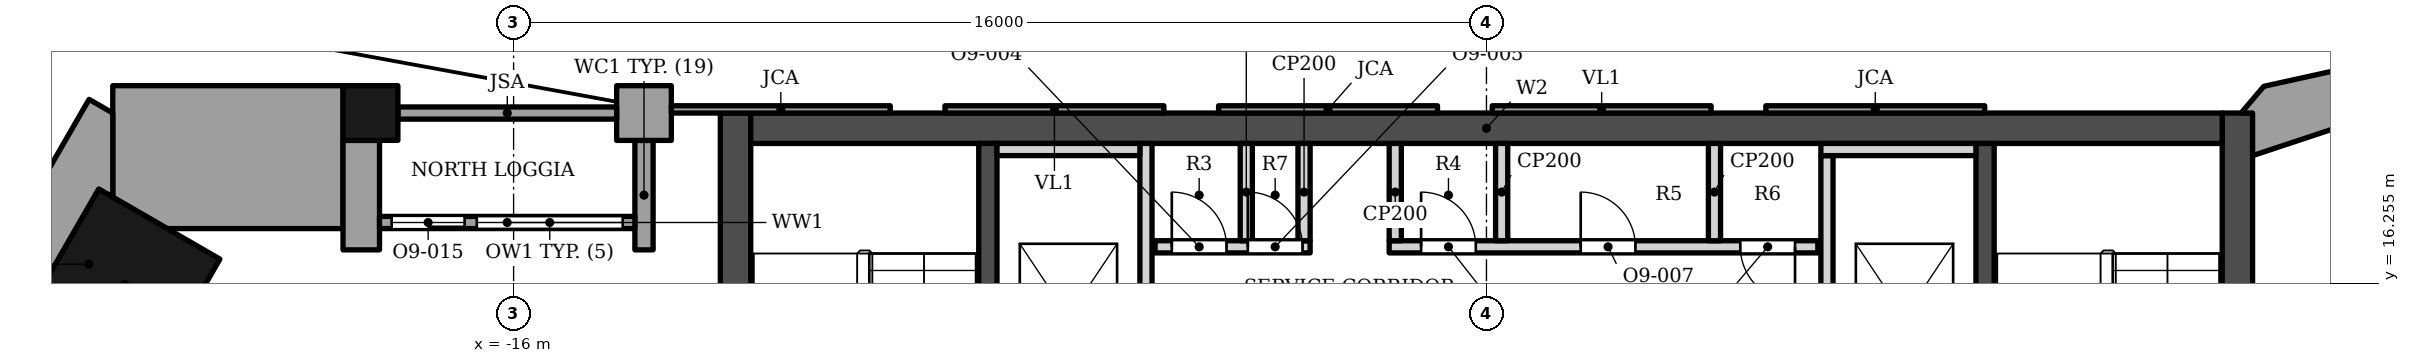
"""IFC4 building model, lengths in metres.
Left out: names, types, materials, properties, quantities, classifications, styles, units other than length and angle.
Written with IfcOpenShell. Run it as: python <this file> out.ifc"""

import sys

from ifc_helpers import new_model, si_unit, direction, frame, frame_2d, origin, origin_2d, place, context, subcontext, project, spatial, polyline, rectangle, outline, extrude, element, fill, save


model = new_model("IFC4")
c1 = context("Model", 3, precision=1e-05, world=origin(), true_north=direction((0.0, 1.0)))
c2 = subcontext(c1, "Body", "Model", "MODEL_VIEW")
j1 = project(units=[si_unit("LENGTHUNIT", "METRE"), si_unit("PLANEANGLEUNIT", "RADIAN")], contexts=[c1])
p1 = place(None, origin())
s1 = spatial("IfcSite", under=j1, at=p1, CompositionType="ELEMENT")
p2 = place(p1, origin())
s2 = spatial("IfcBuilding", under=s1, at=p2, CompositionType="ELEMENT")
p3 = place(p2, frame((0.0, 0.0, 248.2)))
s3 = spatial("IfcBuildingStorey", under=s2, at=p3, CompositionType="ELEMENT", Elevation=248.2)
p4 = place(p3, frame((-12.1, 18.802, 0.0), z_axis=(0.0, 0.0, 1.0), x_axis=(1.0, 0.0, 0.0)))
e1 = element("IfcWall", 1, at=p4, inside=s3, PredefinedType="SHEAR", context=c2, shape_type="SweptSolid", body=[
    extrude(rectangle(XDim=24.2, YDim=0.5, at=frame_2d((12.1, 0.0))), origin(), (0.0, 0.0, 1.0), 3.9),
])
p5 = place(p3, frame((-12.35, 5.253, 0.0), z_axis=(0.0, 0.0, 1.0), x_axis=(0.0, 1.0, 0.0)))
e2 = element("IfcWall", 2, at=p5, inside=s3, PredefinedType="SHEAR", context=c2, shape_type="SweptSolid", body=[
    extrude(rectangle(XDim=13.8, YDim=0.5, at=frame_2d((6.9, 0.0))), origin(), (0.0, 0.0, 1.0), 3.9),
])
p6 = place(p3, frame((-8.2, 5.253, 0.0), z_axis=(0.0, 0.0, 1.0), x_axis=(0.0, 1.0, 0.0)))
e3 = element("IfcWall", 3, at=p6, inside=s3, PredefinedType="SHEAR", context=c2, shape_type="SweptSolid", body=[
    extrude(rectangle(XDim=13.3, YDim=0.3, at=frame_2d((6.65, 0.0))), origin(), (0.0, 0.0, 1.0), 3.9),
])
p7 = place(p6, frame((7.1, 0.0, 0.0)))
e4 = element("IfcOpeningElement", 4, at=p7, cuts=e3, PredefinedType="OPENING", context=c2, shape_type="SweptSolid", body=[
    extrude(rectangle(XDim=1.4, YDim=2.1, at=frame_2d((0.7, 1.05))), frame((0.0, 0.16, 0.0), z_axis=(0.0, -1.0, 0.0), x_axis=(1.0, 0.0, 0.0)), (0.0, 0.0, 1.0), 0.32),
])
p8 = place(p6, frame((5.05, 0.0, 0.0)))
e5 = element("IfcOpeningElement", 5, at=p8, cuts=e3, PredefinedType="OPENING", context=c2, shape_type="SweptSolid", body=[
    extrude(rectangle(XDim=1.4, YDim=2.1, at=frame_2d((0.7, 1.05))), frame((0.0, 0.16, 0.0), z_axis=(0.0, -1.0, 0.0), x_axis=(1.0, 0.0, 0.0)), (0.0, 0.0, 1.0), 0.32),
])
p9 = place(p3, frame((12.35, 5.253, 0.0), z_axis=(0.0, 0.0, 1.0), x_axis=(0.0, 1.0, 0.0)))
e6 = element("IfcWall", 6, at=p9, inside=s3, PredefinedType="SHEAR", context=c2, shape_type="SweptSolid", body=[
    extrude(rectangle(XDim=13.8, YDim=0.5, at=frame_2d((6.9, 0.0))), origin(), (0.0, 0.0, 1.0), 3.9),
])
p10 = place(p3, frame((8.2, 5.253, 0.0), z_axis=(0.0, 0.0, 1.0), x_axis=(0.0, 1.0, 0.0)))
e7 = element("IfcWall", 7, at=p10, inside=s3, PredefinedType="SHEAR", context=c2, shape_type="SweptSolid", body=[
    extrude(rectangle(XDim=13.3, YDim=0.3, at=frame_2d((6.65, 0.0))), origin(), (0.0, 0.0, 1.0), 3.9),
])
p11 = place(p10, frame((7.1, 0.0, 0.0)))
e8 = element("IfcOpeningElement", 8, at=p11, cuts=e7, PredefinedType="OPENING", context=c2, shape_type="SweptSolid", body=[
    extrude(rectangle(XDim=1.4, YDim=2.1, at=frame_2d((0.7, 1.05))), frame((0.0, 0.16, 0.0), z_axis=(0.0, -1.0, 0.0), x_axis=(1.0, 0.0, 0.0)), (0.0, 0.0, 1.0), 0.32),
])
p12 = place(p10, frame((5.05, 0.0, 0.0)))
e9 = element("IfcOpeningElement", 9, at=p12, cuts=e7, PredefinedType="OPENING", context=c2, shape_type="SweptSolid", body=[
    extrude(rectangle(XDim=1.4, YDim=2.1, at=frame_2d((0.7, 1.05))), frame((0.0, 0.16, 0.0), z_axis=(0.0, -1.0, 0.0), x_axis=(1.0, 0.0, 0.0)), (0.0, 0.0, 1.0), 0.32),
])
p13 = place(p3, frame((-22.401, 16.23, 0.0), z_axis=(0.0, 0.0, 1.0), x_axis=(0.866025377604, -0.500000045345, 0.0)))
e10 = element("IfcColumn", 10, at=p13, inside=s3, PredefinedType="COLUMN", context=c2, shape_type="SweptSolid", body=[
    extrude(rectangle(XDim=2.3, YDim=2.3, at=origin_2d()), origin(), (0.0, 0.0, 1.0), 3.9),
])
p14 = place(p3, frame((-18.353, 19.053, 0.0), z_axis=(0.0, 0.0, 1.0), x_axis=(-1.0, 0.0, 0.0)))
e11 = element("IfcColumn", 11, at=p14, inside=s3, PredefinedType="COLUMN", context=c2, shape_type="SweptSolid", body=[
    extrude(rectangle(XDim=0.9, YDim=0.9, at=origin_2d()), origin(), (0.0, 0.0, 1.0), 3.9),
])
p15 = place(p3, origin())
e12 = element("IfcWall", 12, at=p15, inside=s3, PredefinedType="SOLIDWALL", context=c2, shape_type="SweptSolid", body=[
    extrude(outline(polyline([(-13.406, 19.502), (-14.305, 19.502), (-14.305, 18.603), (-13.406, 18.603), (-13.406, 19.502)])), origin(), (0.0, 0.0, 1.0), 3.0),
])
p16 = place(p3, origin())
e13 = element("IfcWall", 13, at=p16, inside=s3, PredefinedType="SOLIDWALL", context=c2, shape_type="SweptSolid", body=[
    extrude(outline(polyline([(-13.705, 16.802), (-13.705, 18.603), (-14.005, 18.603), (-14.005, 16.802), (-13.705, 16.802)])), origin(), (0.0, 0.0, 1.0), 3.0),
])
p17 = place(p3, origin())
e14 = element("IfcWall", 14, at=p17, inside=s3, PredefinedType="SOLIDWALL", context=c2, shape_type="SweptSolid", body=[
    extrude(outline(polyline([(-18.805, 18.603), (-18.805, 16.802), (-18.205, 16.802), (-18.205, 18.603), (-18.805, 18.603)])), origin(), (0.0, 0.0, 1.0), 3.0),
])
p18 = place(p3, origin())
e15 = element("IfcWall", 15, at=p18, inside=s3, PredefinedType="SOLIDWALL", context=c2, shape_type="SweptSolid", body=[
    extrude(outline(polyline([(4.594, 19.173), (4.594, 19.052), (8.195, 19.052), (8.195, 19.173), (4.594, 19.173)])), origin(), (0.0, 0.0, 1.0), 3.0),
])
p19 = place(p3, origin())
e16 = element("IfcWall", 16, at=p19, inside=s3, PredefinedType="ELEMENTEDWALL", context=c2, shape_type="SweptSolid", body=[
    extrude(outline(polyline([(0.094, 19.173), (0.094, 19.052), (3.695, 19.052), (3.695, 19.173), (0.094, 19.173)])), origin(), (0.0, 0.0, 1.0), 3.0),
])
p20 = place(p3, origin())
e17 = element("IfcWall", 17, at=p20, inside=s3, PredefinedType="SOLIDWALL", context=c2, shape_type="SweptSolid", body=[
    extrude(outline(polyline([(-4.406, 19.173), (-4.406, 19.052), (-0.805, 19.052), (-0.805, 19.173), (-4.406, 19.173)])), origin(), (0.0, 0.0, 1.0), 3.0),
])
p21 = place(p3, origin())
e18 = element("IfcWall", 18, at=p21, inside=s3, PredefinedType="ELEMENTEDWALL", context=c2, shape_type="SweptSolid", body=[
    extrude(outline(polyline([(-8.906, 19.173), (-8.906, 19.052), (-5.305, 19.052), (-5.305, 19.173), (-8.906, 19.173)])), origin(), (0.0, 0.0, 1.0), 3.0),
])
p22 = place(p3, origin())
e19 = element("IfcWall", 19, at=p22, inside=s3, PredefinedType="SOLIDWALL", context=c2, shape_type="SweptSolid", body=[
    extrude(outline(polyline([(-13.405, 19.173), (-13.405, 19.052), (-9.805, 19.052), (-9.805, 19.173), (-13.405, 19.173)])), origin(), (0.0, 0.0, 1.0), 3.0),
])
p23 = place(p3, origin())
e20 = element("IfcWall", 20, at=p23, inside=s3, PredefinedType="SOLIDWALL", context=c2, shape_type="SweptSolid", body=[
    extrude(outline(polyline([(-14.305, 19.153), (-17.903, 19.153), (-17.903, 18.953), (-14.305, 18.953), (-14.305, 19.153)])), origin(), (0.0, 0.0, 1.0), 3.0),
])
p24 = place(p3, frame((-14.005, 17.252, 0.0), z_axis=(0.0, 0.0, 1.0), x_axis=(-1.0, 0.0, 0.0)))
e21 = element("IfcWall", 21, at=p24, inside=s3, PredefinedType="ELEMENTEDWALL", context=c2, shape_type="SweptSolid", body=[
    extrude(rectangle(XDim=4.2, YDim=0.2, at=frame_2d((2.1, 0.0))), origin(), (0.0, 0.0, 1.0), 3.0),
])
p25 = place(p24, frame((0.2, 0.0, 0.45)))
e22 = element("IfcOpeningElement", 22, at=p25, cuts=e21, PredefinedType="OPENING", context=c2, shape_type="SweptSolid", body=[
    extrude(rectangle(XDim=2.4, YDim=2.25, at=frame_2d((1.2, 1.125))), frame((0.0, 0.11, 0.0), z_axis=(0.0, -1.0, 0.0), x_axis=(1.0, 0.0, 0.0)), (0.0, 0.0, 1.0), 0.22),
])
p26 = place(p24, frame((2.8, 0.0, 0.0)))
e23 = element("IfcOpeningElement", 23, at=p26, cuts=e21, PredefinedType="OPENING", context=c2, shape_type="SweptSolid", body=[
    extrude(rectangle(XDim=1.2, YDim=2.7, at=frame_2d((0.6, 1.35))), frame((0.0, 0.11, 0.0), z_axis=(0.0, -1.0, 0.0), x_axis=(1.0, 0.0, 0.0)), (0.0, 0.0, 1.0), 0.22),
])
p27 = place(p3, origin())
e24 = element("IfcWall", 24, at=p27, inside=s3, PredefinedType="SOLIDWALL", context=c2, shape_type="SweptSolid", body=[
    extrude(outline(polyline([(-21.699, 17.153), (-18.805, 17.153), (-18.805, 19.502), (-22.592, 19.502), (-22.592, 17.668), (-21.699, 17.153)])), origin(), (0.0, 0.0, 1.0), 3.0),
])
p28 = place(p3, origin())
e25 = element("IfcWall", 25, at=p28, inside=s3, PredefinedType="SOLIDWALL", context=c2, shape_type="SweptSolid", body=[
    extrude(outline(polyline([(-22.822, 17.801), (-22.592, 17.668), (-22.592, 19.052), (-22.982, 19.278), (-25.331, 15.208), (-23.296, 14.033), (-22.696, 15.073), (-23.972, 15.809), (-22.822, 17.801)])), origin(), (0.0, 0.0, 1.0), 3.0),
])
p29 = place(p3, origin())
e26 = element("IfcWall", 26, at=p29, inside=s3, PredefinedType="SOLIDWALL", context=c2, shape_type="SweptSolid", body=[
    extrude(outline(polyline([(14.201, 18.883), (14.008, 19.762), (12.784, 19.492), (12.41, 19.052), (12.6, 19.052), (12.6, 18.352), (14.201, 18.883)])), origin(), (0.0, 0.0, 1.0), 3.0),
])
p30 = place(p3, frame((-5.6, 14.253, 0.0), z_axis=(0.0, 0.0, 1.0), x_axis=(0.0, 1.0, 0.0)))
e27 = element("IfcWall", 27, at=p30, inside=s3, PredefinedType="SOLIDWALL", context=c2, shape_type="SweptSolid", body=[
    extrude(rectangle(XDim=4.3, YDim=0.2, at=frame_2d((2.15, 0.0))), origin(), (0.0, 0.0, 1.0), 3.73),
])
p31 = place(p3, frame((5.6, 15.453, 0.0), z_axis=(0.0, 0.0, 1.0), x_axis=(0.0, 1.0, 0.0)))
e28 = element("IfcWall", 28, at=p31, inside=s3, PredefinedType="SOLIDWALL", context=c2, shape_type="SweptSolid", body=[
    extrude(rectangle(XDim=2.9, YDim=0.2, at=frame_2d((1.45, 0.0))), origin(), (0.0, 0.0, 1.0), 3.73),
])
p32 = place(p3, frame((-5.45, 16.853, 0.0), z_axis=(0.0, 0.0, 1.0), x_axis=(1.0, 0.0, 0.0)))
e29 = element("IfcWall", 29, at=p32, inside=s3, PredefinedType="SOLIDWALL", context=c2, shape_type="SweptSolid", body=[
    extrude(rectangle(XDim=2.55, YDim=0.2, at=frame_2d((1.275, 0.0))), origin(), (0.0, 0.0, 1.0), 3.73),
])
p33 = place(p32, frame((0.275, 0.0, 0.0)))
e30 = element("IfcOpeningElement", 30, at=p33, cuts=e29, PredefinedType="OPENING", context=c2, shape_type="SweptSolid", body=[
    extrude(rectangle(XDim=0.9, YDim=2.1, at=frame_2d((0.45, 1.05))), frame((0.0, 0.11, 0.0), z_axis=(0.0, -1.0, 0.0), x_axis=(1.0, 0.0, 0.0)), (0.0, 0.0, 1.0), 0.22),
])
p34 = place(p32, frame((1.525, 0.0, 0.0)))
e31 = element("IfcOpeningElement", 31, at=p34, cuts=e29, PredefinedType="OPENING", context=c2, shape_type="SweptSolid", body=[
    extrude(rectangle(XDim=0.9, YDim=2.1, at=frame_2d((0.45, 1.05))), frame((0.0, 0.11, 0.0), z_axis=(0.0, -1.0, 0.0), x_axis=(1.0, 0.0, 0.0)), (0.0, 0.0, 1.0), 0.22),
])
p35 = place(p3, frame((-1.6, 16.853, 0.0), z_axis=(0.0, 0.0, 1.0), x_axis=(1.0, 0.0, 0.0)))
e32 = element("IfcWall", 32, at=p35, inside=s3, PredefinedType="SOLIDWALL", context=c2, shape_type="SweptSolid", body=[
    extrude(rectangle(XDim=7.05, YDim=0.2, at=frame_2d((3.525, 0.0))), origin(), (0.0, 0.0, 1.0), 3.73),
])
p36 = place(p35, frame((0.525, 0.0, 0.0)))
e33 = element("IfcOpeningElement", 33, at=p36, cuts=e32, PredefinedType="OPENING", context=c2, shape_type="SweptSolid", body=[
    extrude(rectangle(XDim=0.9, YDim=2.1, at=frame_2d((0.45, 1.05))), frame((0.0, 0.11, 0.0), z_axis=(0.0, -1.0, 0.0), x_axis=(1.0, 0.0, 0.0)), (0.0, 0.0, 1.0), 0.22),
])
p37 = place(p35, frame((3.15, 0.0, 0.0)))
e34 = element("IfcOpeningElement", 34, at=p37, cuts=e32, PredefinedType="OPENING", context=c2, shape_type="SweptSolid", body=[
    extrude(rectangle(XDim=0.9, YDim=2.1, at=frame_2d((0.45, 1.05))), frame((0.0, 0.11, 0.0), z_axis=(0.0, -1.0, 0.0), x_axis=(1.0, 0.0, 0.0)), (0.0, 0.0, 1.0), 0.22),
])
p38 = place(p35, frame((5.775, 0.0, 0.0)))
e35 = element("IfcOpeningElement", 35, at=p38, cuts=e32, PredefinedType="OPENING", context=c2, shape_type="SweptSolid", body=[
    extrude(rectangle(XDim=0.9, YDim=2.1, at=frame_2d((0.45, 1.05))), frame((0.0, 0.11, 0.0), z_axis=(0.0, -1.0, 0.0), x_axis=(1.0, 0.0, 0.0)), (0.0, 0.0, 1.0), 0.22),
])
for number, where, z_axis, x_axis in (
    (36, (-3.95, 16.953, 0.0), (0.0, 0.0, 1.0), (0.0, 1.0, 0.0)),
    (37, (-3.0, 16.953, 0.0), (0.0, 0.0, 1.0), (0.0, 1.0, 0.0)),
    (38, (-1.5, 16.953, 0.0), (0.0, 0.0, 1.0), (0.0, 1.0, 0.0)),
    (39, (0.25, 16.953, 0.0), (0.0, 0.0, 1.0), (0.0, 1.0, 0.0)),
    (40, (3.75, 16.953, 0.0), (0.0, 0.0, 1.0), (0.0, 1.0, 0.0)),
):
    element("IfcWall", number, at=place(p3, frame(where, z_axis=z_axis, x_axis=x_axis)), inside=s3, PredefinedType="PARTITIONING", context=c2, shape_type="SweptSolid", body=[
        extrude(rectangle(XDim=1.6, YDim=0.2, at=frame_2d((0.8, 0.0))), origin(), (0.0, 0.0, 1.0), 3.73),
    ])
p39 = place(p3, frame((-8.05, 18.453, 0.0), z_axis=(0.0, 0.0, 1.0), x_axis=(1.0, 0.0, 0.0)))
e41 = element("IfcWall", 41, at=p39, inside=s3, PredefinedType="SOLIDWALL", context=c2, shape_type="SweptSolid", body=[
    extrude(rectangle(XDim=2.35, YDim=0.2, at=frame_2d((1.175, 0.0))), origin(), (0.0, 0.0, 1.0), 3.73),
])
p40 = place(p3, frame((5.5, 18.453, 0.0), z_axis=(0.0, 0.0, 1.0), x_axis=(1.0, 0.0, 0.0)))
e42 = element("IfcWall", 42, at=p40, inside=s3, PredefinedType="SOLIDWALL", context=c2, shape_type="SweptSolid", body=[
    extrude(rectangle(XDim=2.55, YDim=0.2, at=frame_2d((1.275, 0.0))), origin(), (0.0, 0.0, 1.0), 3.73),
])
p41 = place(p25, origin())
e43 = element("IfcWindow", 43, at=p41, inside=s3, PartitioningType="SINGLE_PANEL", PredefinedType="WINDOW", context=c2, shape_type="SweptSolid", body=[
    extrude(rectangle(XDim=2.4, YDim=2.25, at=frame_2d((1.2, 1.125))), frame((0.0, 0.03, 0.0), z_axis=(0.0, -1.0, 0.0), x_axis=(1.0, 0.0, 0.0)), (0.0, 0.0, 1.0), 0.06),
])
fill(e22, e43)
p42 = place(p26, origin())
e44 = element("IfcDoor", 44, at=p42, inside=s3, OperationType="SINGLE_SWING_LEFT", PredefinedType="DOOR", context=c2, shape_type="SweptSolid", body=[
    extrude(rectangle(XDim=1.2, YDim=2.7, at=frame_2d((0.6, 1.35))), frame((0.0, 0.025, 0.0), z_axis=(0.0, -1.0, 0.0), x_axis=(1.0, 0.0, 0.0)), (0.0, 0.0, 1.0), 0.05),
])
fill(e23, e44)
p43 = place(p33, origin())
e45 = element("IfcDoor", 45, at=p43, inside=s3, OperationType="SINGLE_SWING_LEFT", PredefinedType="DOOR", context=c2, shape_type="SweptSolid", body=[
    extrude(rectangle(XDim=0.9, YDim=2.1, at=frame_2d((0.45, 1.05))), frame((0.0, 0.025, 0.0), z_axis=(0.0, -1.0, 0.0), x_axis=(1.0, 0.0, 0.0)), (0.0, 0.0, 1.0), 0.05),
])
fill(e30, e45)
p44 = place(p34, origin())
e46 = element("IfcDoor", 46, at=p44, inside=s3, OperationType="SINGLE_SWING_LEFT", PredefinedType="DOOR", context=c2, shape_type="SweptSolid", body=[
    extrude(rectangle(XDim=0.9, YDim=2.1, at=frame_2d((0.45, 1.05))), frame((0.0, 0.025, 0.0), z_axis=(0.0, -1.0, 0.0), x_axis=(1.0, 0.0, 0.0)), (0.0, 0.0, 1.0), 0.05),
])
fill(e31, e46)
p45 = place(p36, origin())
e47 = element("IfcDoor", 47, at=p45, inside=s3, OperationType="SINGLE_SWING_LEFT", PredefinedType="DOOR", context=c2, shape_type="SweptSolid", body=[
    extrude(rectangle(XDim=0.9, YDim=2.1, at=frame_2d((0.45, 1.05))), frame((0.0, 0.025, 0.0), z_axis=(0.0, -1.0, 0.0), x_axis=(1.0, 0.0, 0.0)), (0.0, 0.0, 1.0), 0.05),
])
fill(e33, e47)
p46 = place(p37, origin())
e48 = element("IfcDoor", 48, at=p46, inside=s3, OperationType="SINGLE_SWING_LEFT", PredefinedType="DOOR", context=c2, shape_type="SweptSolid", body=[
    extrude(rectangle(XDim=0.9, YDim=2.1, at=frame_2d((0.45, 1.05))), frame((0.0, 0.025, 0.0), z_axis=(0.0, -1.0, 0.0), x_axis=(1.0, 0.0, 0.0)), (0.0, 0.0, 1.0), 0.05),
])
fill(e34, e48)
p47 = place(p38, origin())
e49 = element("IfcDoor", 49, at=p47, inside=s3, OperationType="SINGLE_SWING_RIGHT", PredefinedType="DOOR", context=c2, shape_type="SweptSolid", body=[
    extrude(rectangle(XDim=0.9, YDim=2.1, at=frame_2d((0.45, 1.05))), frame((0.0, 0.025, 0.0), z_axis=(0.0, -1.0, 0.0), x_axis=(1.0, 0.0, 0.0)), (0.0, 0.0, 1.0), 0.05),
])
fill(e35, e49)
save(model, sys.argv[1])
